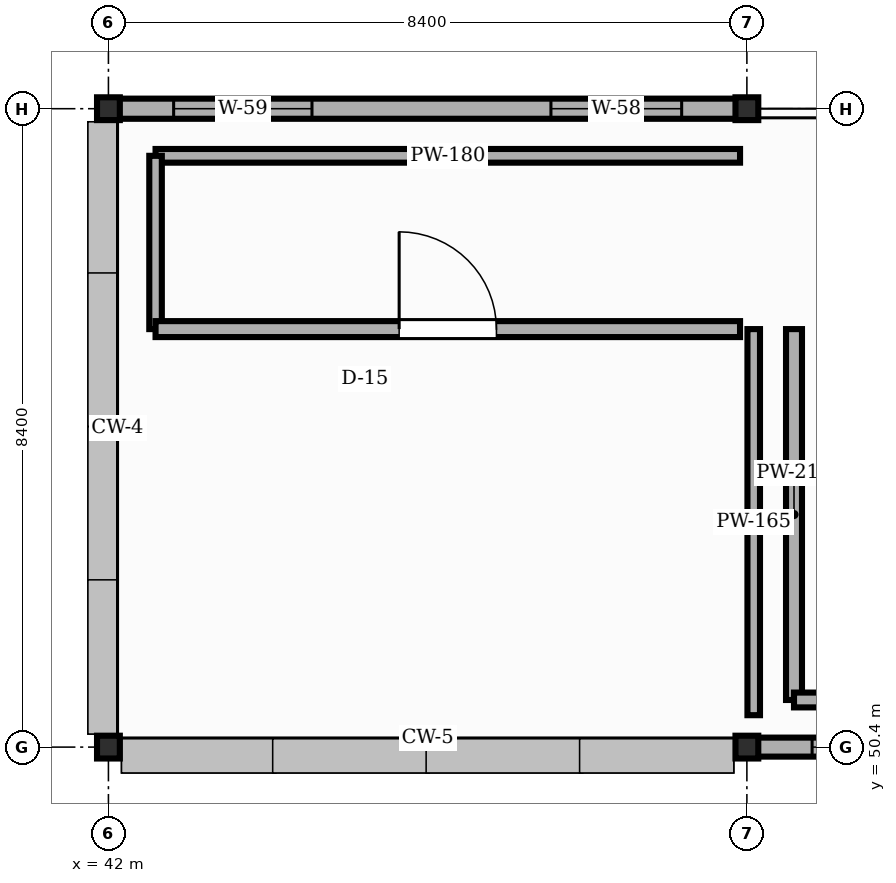
"""IFC4 building model, lengths in metres.
Left out: names, types, materials, properties, quantities, classifications, styles, units other than length and angle.
Written with IfcOpenShell. Run it as: python <this file> out.ifc"""

import sys

from ifc_helpers import new_model, si_unit, direction, frame, frame_2d, origin, origin_2d, place, context, subcontext, project, spatial, rectangle, i_section, extrude, element, fill, save


model = new_model("IFC4")
c1 = context("Model", 3, precision=1e-05, world=origin(), true_north=direction((0.0, 1.0)))
c2 = subcontext(c1, "Body", "Model", "MODEL_VIEW")
j1 = project(units=[si_unit("LENGTHUNIT", "METRE"), si_unit("PLANEANGLEUNIT", "RADIAN")], contexts=[c1])
p1 = place(None, origin())
s1 = spatial("IfcSite", under=j1, at=p1, CompositionType="ELEMENT")
p2 = place(p1, origin())
s2 = spatial("IfcBuilding", under=s1, at=p2, CompositionType="ELEMENT")
p3 = place(p2, frame((0.0, 0.0, 5.4)))
s3 = spatial("IfcBuildingStorey", under=s2, at=p3, CompositionType="ELEMENT", Elevation=5.4)
for number, where, z_axis, x_axis in (
    (1, (42.0, 50.4, 0.0), (0.0, 0.0, 1.0), (1.0, 0.0, 0.0)),
    (2, (42.0, 58.8, 0.0), (0.0, 0.0, 1.0), (1.0, 0.0, 0.0)),
    (3, (50.4, 50.4, 0.0), (0.0, 0.0, 1.0), (1.0, 0.0, 0.0)),
    (4, (50.4, 58.8, 0.0), (0.0, 0.0, 1.0), (1.0, 0.0, 0.0)),
):
    element("IfcColumn", number, at=place(p3, frame(where, z_axis=z_axis, x_axis=x_axis)), inside=s3, PredefinedType="COLUMN", context=c2, shape_type="SweptSolid", body=[
        extrude(i_section(OverallWidth=0.3, OverallDepth=0.3, WebThickness=0.011, FlangeThickness=0.019, FilletRadius=0.027, at=origin_2d()), origin(), (0.0, 0.0, 1.0), 4.5),
    ])
p4 = place(p3, frame((50.392, 58.8, 0.0), z_axis=(0.0, 0.0, 1.0), x_axis=(-1.0, 0.0, 0.0)))
e5 = element("IfcWall", 5, at=p4, inside=s3, PredefinedType="STANDARD", context=c2, shape_type="SweptSolid", body=[
    extrude(rectangle(XDim=8.384, YDim=0.265, at=frame_2d((4.192, 0.0))), origin(), (0.0, 0.0, 1.0), 3.922),
])
p5 = place(p4, frame((0.85, 0.0, 0.9)))
e6 = element("IfcOpeningElement", 6, at=p5, cuts=e5, PredefinedType="OPENING", context=c2, shape_type="SweptSolid", body=[
    extrude(rectangle(XDim=1.72, YDim=2.05, at=frame_2d((0.86, 1.025))), frame((0.0, 0.142, 0.0), z_axis=(0.0, -1.0, 0.0), x_axis=(1.0, 0.0, 0.0)), (0.0, 0.0, 1.0), 0.285),
])
p6 = place(p4, frame((5.714, 0.0, 0.9)))
e7 = element("IfcOpeningElement", 7, at=p6, cuts=e5, PredefinedType="OPENING", context=c2, shape_type="SweptSolid", body=[
    extrude(rectangle(XDim=1.82, YDim=2.05, at=frame_2d((0.91, 1.025))), frame((0.0, 0.142, 0.0), z_axis=(0.0, -1.0, 0.0), x_axis=(1.0, 0.0, 0.0)), (0.0, 0.0, 1.0), 0.285),
])
p7 = place(p3, frame((50.408, 50.4, 0.0), z_axis=(0.0, 0.0, 1.0), x_axis=(1.0, 0.0, 0.0)))
e8 = element("IfcWall", 8, at=p7, inside=s3, PredefinedType="STANDARD", context=c2, shape_type="SweptSolid", body=[
    extrude(rectangle(XDim=8.384, YDim=0.25, at=frame_2d((4.192, 0.0))), origin(), (0.0, 0.0, 1.0), 3.922),
])
p8 = place(p7, frame((0.85, 0.0, 0.9)))
e9 = element("IfcOpeningElement", 9, at=p8, cuts=e8, PredefinedType="OPENING", context=c2, shape_type="SweptSolid", body=[
    extrude(rectangle(XDim=1.92, YDim=2.05, at=frame_2d((0.96, 1.025))), frame((0.0, 0.135, 0.0), z_axis=(0.0, -1.0, 0.0), x_axis=(1.0, 0.0, 0.0)), (0.0, 0.0, 1.0), 0.27),
])
p9 = place(p7, frame((6.514, 0.0, 0.9)))
e10 = element("IfcOpeningElement", 10, at=p9, cuts=e8, PredefinedType="OPENING", context=c2, shape_type="SweptSolid", body=[
    extrude(rectangle(XDim=1.02, YDim=1.05, at=frame_2d((0.51, 0.525))), frame((0.0, 0.135, 0.0), z_axis=(0.0, -1.0, 0.0), x_axis=(1.0, 0.0, 0.0)), (0.0, 0.0, 1.0), 0.27),
])
p10 = place(p3, frame((50.49, 50.82, -0.004), z_axis=(0.0, 0.0, 1.0), x_axis=(0.0, 1.0, 0.0)))
e11 = element("IfcWall", 11, at=p10, inside=s3, PredefinedType="STANDARD", context=c2, shape_type="SweptSolid", body=[
    extrude(rectangle(XDim=5.08, YDim=0.165, at=frame_2d((2.54, 0.0))), origin(), (0.0, 0.0, 1.0), 3.926),
])
p11 = place(p3, frame((51.02, 55.9, -0.004), z_axis=(0.0, 0.0, 1.0), x_axis=(0.0, -1.0, 0.0)))
e12 = element("IfcWall", 12, at=p11, inside=s3, PredefinedType="STANDARD", context=c2, shape_type="SweptSolid", body=[
    extrude(rectangle(XDim=4.88, YDim=0.21, at=frame_2d((2.44, 0.0))), origin(), (0.0, 0.0, 1.0), 4.294),
])
p12 = place(p3, frame((51.02, 51.02, -0.004), z_axis=(0.0, 0.0, 1.0), x_axis=(1.0, 0.0, 0.0)))
e13 = element("IfcWall", 13, at=p12, inside=s3, PredefinedType="STANDARD", context=c2, shape_type="SweptSolid", body=[
    extrude(rectangle(XDim=2.28, YDim=0.195, at=frame_2d((1.14, 0.0))), origin(), (0.0, 0.0, 1.0), 4.294),
])
p13 = place(p3, frame((50.31, 58.18, -0.004), z_axis=(0.0, 0.0, 1.0), x_axis=(-1.0, 0.0, 0.0)))
e14 = element("IfcWall", 14, at=p13, inside=s3, PredefinedType="STANDARD", context=c2, shape_type="SweptSolid", body=[
    extrude(rectangle(XDim=7.69, YDim=0.18, at=frame_2d((3.845, 0.0))), origin(), (0.0, 0.0, 1.0), 4.294),
])
p14 = place(p3, frame((42.62, 58.18, -0.004), z_axis=(0.0, 0.0, 1.0), x_axis=(0.0, -1.0, 0.0)))
e15 = element("IfcWall", 15, at=p14, inside=s3, PredefinedType="STANDARD", context=c2, shape_type="SweptSolid", body=[
    extrude(rectangle(XDim=2.28, YDim=0.165, at=frame_2d((1.14, 0.0))), origin(), (0.0, 0.0, 1.0), 4.294),
])
p15 = place(p3, frame((42.62, 55.9, -0.004), z_axis=(0.0, 0.0, 1.0), x_axis=(1.0, 0.0, 0.0)))
e16 = element("IfcWall", 16, at=p15, inside=s3, PredefinedType="STANDARD", context=c2, shape_type="SweptSolid", body=[
    extrude(rectangle(XDim=7.69, YDim=0.21, at=frame_2d((3.845, 0.0))), origin(), (0.0, 0.0, 1.0), 4.294),
])
p16 = place(p15, frame((3.205, 0.0, 0.0)))
e17 = element("IfcOpeningElement", 17, at=p16, cuts=e16, PredefinedType="OPENING", context=c2, shape_type="SweptSolid", body=[
    extrude(rectangle(XDim=1.28, YDim=2.14, at=frame_2d((0.64, 1.07))), frame((0.0, 0.115, 0.0), z_axis=(0.0, -1.0, 0.0), x_axis=(1.0, 0.0, 0.0)), (0.0, 0.0, 1.0), 0.23),
])
p17 = place(p5, origin())
e18 = element("IfcWindow", 18, at=p17, inside=s3, PartitioningType="SINGLE_PANEL", PredefinedType="WINDOW", context=c2, shape_type="SweptSolid", body=[
    extrude(rectangle(XDim=1.72, YDim=2.05, at=frame_2d((0.86, 1.025))), frame((0.0, 0.03, 0.0), z_axis=(0.0, -1.0, 0.0), x_axis=(1.0, 0.0, 0.0)), (0.0, 0.0, 1.0), 0.06),
])
fill(e6, e18)
p18 = place(p6, origin())
e19 = element("IfcWindow", 19, at=p18, inside=s3, PartitioningType="SINGLE_PANEL", PredefinedType="WINDOW", context=c2, shape_type="SweptSolid", body=[
    extrude(rectangle(XDim=1.82, YDim=2.05, at=frame_2d((0.91, 1.025))), frame((0.0, 0.03, 0.0), z_axis=(0.0, -1.0, 0.0), x_axis=(1.0, 0.0, 0.0)), (0.0, 0.0, 1.0), 0.06),
])
fill(e7, e19)
p19 = place(p8, origin())
e20 = element("IfcWindow", 20, at=p19, inside=s3, PartitioningType="SINGLE_PANEL", PredefinedType="WINDOW", context=c2, shape_type="SweptSolid", body=[
    extrude(rectangle(XDim=1.92, YDim=2.05, at=frame_2d((0.96, 1.025))), frame((0.0, 0.03, 0.0), z_axis=(0.0, -1.0, 0.0), x_axis=(1.0, 0.0, 0.0)), (0.0, 0.0, 1.0), 0.06),
])
fill(e9, e20)
p20 = place(p16, origin())
e21 = element("IfcDoor", 21, at=p20, inside=s3, OperationType="SINGLE_SWING_LEFT", PredefinedType="DOOR", context=c2, shape_type="SweptSolid", body=[
    extrude(rectangle(XDim=1.28, YDim=2.14, at=frame_2d((0.64, 1.07))), frame((0.0, 0.025, 0.0), z_axis=(0.0, -1.0, 0.0), x_axis=(1.0, 0.0, 0.0)), (0.0, 0.0, 1.0), 0.05),
])
fill(e17, e21)
save(model, sys.argv[1])
